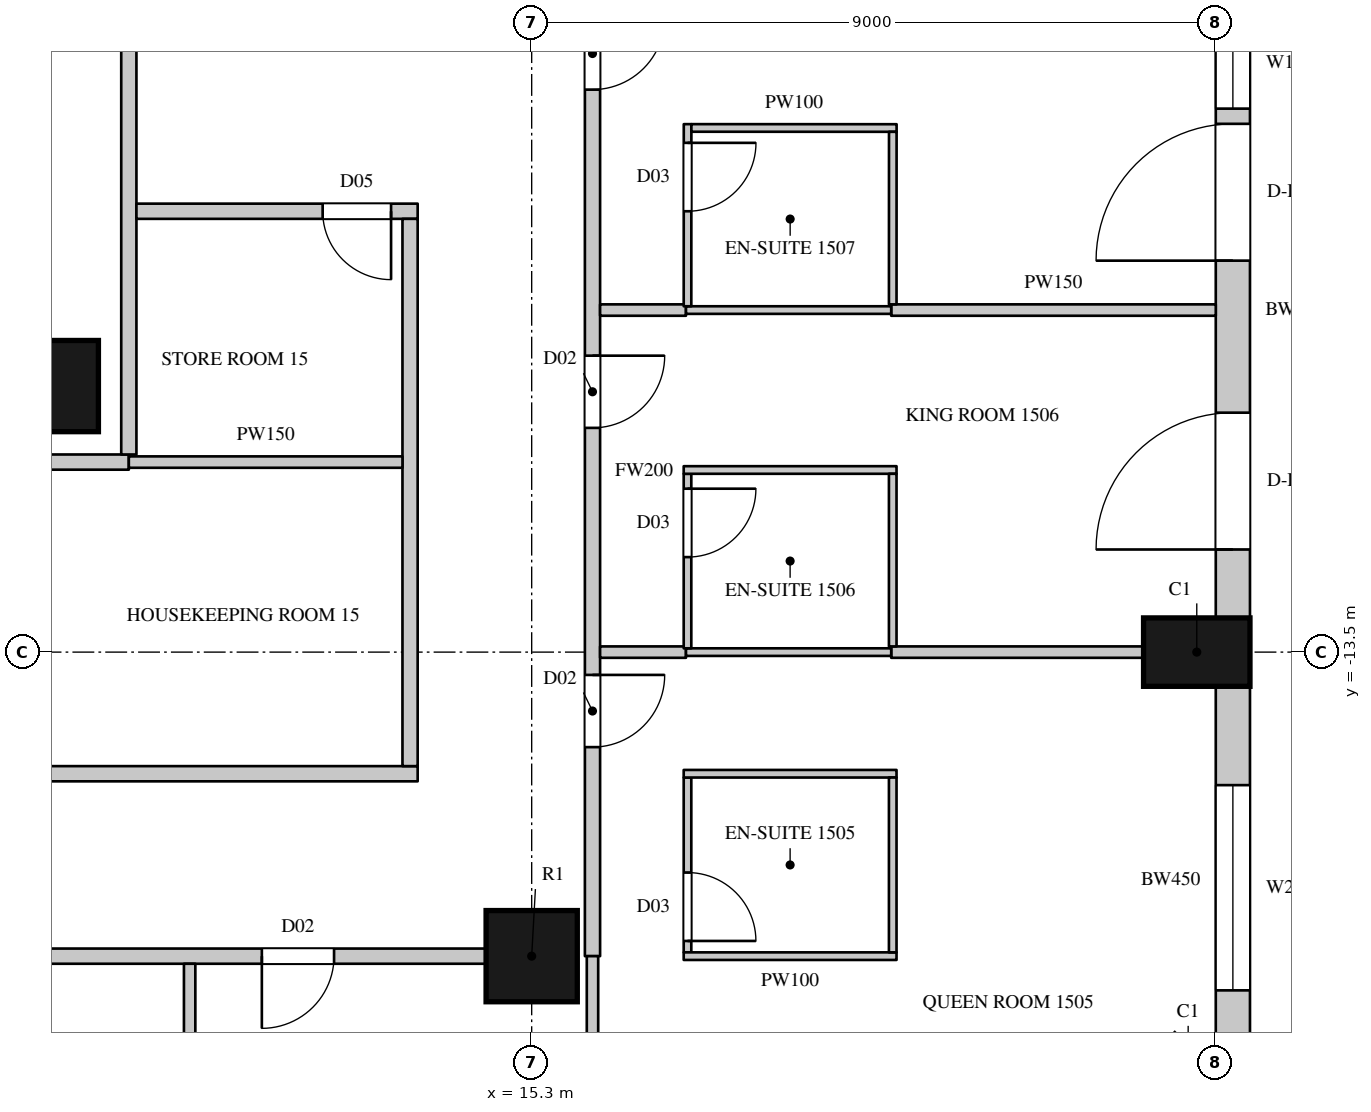
"""IFC4 building model, lengths in metres.
Left out: names, types, materials, properties, quantities, classifications, styles, units other than length and angle.
Written with IfcOpenShell. Run it as: python <this file> out.ifc"""

import sys

from ifc_helpers import new_model, si_unit, direction, frame, frame_2d, origin, origin_2d, place, context, subcontext, project, spatial, rectangle, circle, extrude, element, fill, save


model = new_model("IFC4")
c1 = context("Model", 3, precision=1e-05, world=origin(), true_north=direction((0.0, 1.0)))
c2 = subcontext(c1, "Body", "Model", "MODEL_VIEW")
j1 = project(units=[si_unit("LENGTHUNIT", "METRE"), si_unit("PLANEANGLEUNIT", "RADIAN")], contexts=[c1])
p1 = place(None, origin())
s1 = spatial("IfcSite", under=j1, at=p1, CompositionType="ELEMENT")
p2 = place(p1, origin())
s2 = spatial("IfcBuilding", under=s1, at=p2, CompositionType="ELEMENT")
p3 = place(p2, frame((0.0, 0.0, 84.3)))
s3 = spatial("IfcBuildingStorey", under=s2, at=p3, CompositionType="ELEMENT", Elevation=84.3)
p4 = place(p3, frame((24.05, -13.5, 0.0), z_axis=(0.0, 0.0, 1.0), x_axis=(0.0, 1.0, 0.0)))
e1 = element("IfcColumn", 1, at=p4, inside=s3, PredefinedType="COLUMN", context=c2, shape_type="SweptSolid", body=[
    extrude(rectangle(XDim=0.9, YDim=1.4, at=origin_2d()), origin(), (0.0, 0.0, 1.0), 3.6),
])
for number, where, z_axis, x_axis in (
    (2, (15.3, -17.5, 0.0), (0.0, 0.0, 1.0), (1.0, 0.0, 0.0)),
    (3, (9.0, -10.0, 0.0), (0.0, 0.0, 1.0), (1.0, 0.0, 0.0)),
):
    element("IfcColumn", number, at=place(p3, frame(where, z_axis=z_axis, x_axis=x_axis)), inside=s3, PredefinedType="COLUMN", context=c2, shape_type="SweptSolid", body=[
        extrude(circle(Radius=0.6, at=origin_2d()), origin(), (0.0, 0.0, 1.0), 3.6),
    ])
p5 = place(p3, frame((24.525, -19.064, 0.0), z_axis=(0.0, 0.0, 1.0), x_axis=(0.0, 1.0, 0.0)))
e4 = element("IfcWall", 4, at=p5, inside=s3, PredefinedType="SOLIDWALL", context=c2, shape_type="SweptSolid", body=[
    extrude(rectangle(XDim=5.114, YDim=0.45, at=frame_2d((2.557, 0.0))), origin(), (0.0, 0.0, 1.0), 3.3),
])
p6 = place(p5, frame((1.114, 0.0, 1.05)))
e5 = element("IfcOpeningElement", 5, at=p6, cuts=e4, PredefinedType="OPENING", context=c2, shape_type="SweptSolid", body=[
    extrude(rectangle(XDim=2.7, YDim=2.0, at=frame_2d((1.35, 1.0))), frame((0.0, 0.235, 0.0), z_axis=(0.0, -1.0, 0.0), x_axis=(1.0, 0.0, 0.0)), (0.0, 0.0, 1.0), 0.47),
])
p7 = place(p3, frame((24.525, -13.05, 0.0), z_axis=(0.0, 0.0, 1.0), x_axis=(0.0, 1.0, 0.0)))
e6 = element("IfcWall", 6, at=p7, inside=s3, PredefinedType="SOLIDWALL", context=c2, shape_type="SweptSolid", body=[
    extrude(rectangle(XDim=8.1, YDim=0.45, at=frame_2d((4.05, 0.0))), origin(), (0.0, 0.0, 1.0), 3.3),
])
p8 = place(p7, frame((0.9, 0.0, 0.0)))
e7 = element("IfcOpeningElement", 7, at=p8, cuts=e6, PredefinedType="OPENING", context=c2, shape_type="SweptSolid", body=[
    extrude(rectangle(XDim=1.8, YDim=2.4, at=frame_2d((0.9, 1.2))), frame((0.0, 0.235, 0.0), z_axis=(0.0, -1.0, 0.0), x_axis=(1.0, 0.0, 0.0)), (0.0, 0.0, 1.0), 0.47),
])
p9 = place(p7, frame((4.7, 0.0, 0.0)))
e8 = element("IfcOpeningElement", 8, at=p9, cuts=e6, PredefinedType="OPENING", context=c2, shape_type="SweptSolid", body=[
    extrude(rectangle(XDim=1.8, YDim=2.4, at=frame_2d((0.9, 1.2))), frame((0.0, 0.235, 0.0), z_axis=(0.0, -1.0, 0.0), x_axis=(1.0, 0.0, 0.0)), (0.0, 0.0, 1.0), 0.47),
])
p10 = place(p7, frame((6.7, 0.0, 1.05)))
e9 = element("IfcOpeningElement", 9, at=p10, cuts=e6, PredefinedType="OPENING", context=c2, shape_type="SweptSolid", body=[
    extrude(rectangle(XDim=1.2, YDim=2.0, at=frame_2d((0.6, 1.0))), frame((0.0, 0.235, 0.0), z_axis=(0.0, -1.0, 0.0), x_axis=(1.0, 0.0, 0.0)), (0.0, 0.0, 1.0), 0.47),
])
p11 = place(p3, frame((6.9, -17.5, 0.0), z_axis=(0.0, 0.0, 1.0), x_axis=(1.0, 0.0, 0.0)))
e10 = element("IfcWall", 10, at=p11, inside=s3, PredefinedType="PARTITIONING", context=c2, shape_type="SweptSolid", body=[
    extrude(rectangle(XDim=7.8, YDim=0.2, at=frame_2d((3.9, 0.0))), origin(), (0.0, 0.0, 1.0), 2.75),
])
p12 = place(p11, frame((4.85, 0.0, 0.0)))
e11 = element("IfcOpeningElement", 11, at=p12, cuts=e10, PredefinedType="OPENING", context=c2, shape_type="SweptSolid", body=[
    extrude(rectangle(XDim=0.95, YDim=2.2, at=frame_2d((0.475, 1.1))), frame((0.0, 0.11, 0.0), z_axis=(0.0, -1.0, 0.0), x_axis=(1.0, 0.0, 0.0)), (0.0, 0.0, 1.0), 0.22),
])
p13 = place(p3, frame((-8.1, -11.0, 0.0), z_axis=(0.0, 0.0, 1.0), x_axis=(1.0, 0.0, 0.0)))
e12 = element("IfcWall", 12, at=p13, inside=s3, PredefinedType="PARTITIONING", context=c2, shape_type="SweptSolid", body=[
    extrude(rectangle(XDim=18.1, YDim=0.2, at=frame_2d((9.05, 0.0))), origin(), (0.0, 0.0, 1.0), 3.3),
])
p14 = place(p13, frame((1.7, 0.0, 0.0)))
e13 = element("IfcOpeningElement", 13, at=p14, cuts=e12, PredefinedType="OPENING", context=c2, shape_type="SweptSolid", body=[
    extrude(rectangle(XDim=1.5, YDim=2.2, at=frame_2d((0.75, 1.1))), frame((0.0, 0.11, 0.0), z_axis=(0.0, -1.0, 0.0), x_axis=(1.0, 0.0, 0.0)), (0.0, 0.0, 1.0), 0.22),
])
p15 = place(p3, frame((-4.5, -15.1, 0.0), z_axis=(0.0, 0.0, 1.0), x_axis=(1.0, 0.0, 0.0)))
e14 = element("IfcWall", 14, at=p15, inside=s3, PredefinedType="PARTITIONING", context=c2, shape_type="SweptSolid", body=[
    extrude(rectangle(XDim=18.3, YDim=0.2, at=frame_2d((9.15, 0.0))), origin(), (0.0, 0.0, 1.0), 3.3),
])
p16 = place(p15, frame((10.05, 0.0, 0.0)))
e15 = element("IfcOpeningElement", 15, at=p16, cuts=e14, PredefinedType="OPENING", context=c2, shape_type="SweptSolid", body=[
    extrude(rectangle(XDim=0.9, YDim=2.2, at=frame_2d((0.45, 1.1))), frame((0.0, 0.11, 0.0), z_axis=(0.0, -1.0, 0.0), x_axis=(1.0, 0.0, 0.0)), (0.0, 0.0, 1.0), 0.22),
])
p17 = place(p3, frame((10.0, -10.9, 0.0), z_axis=(0.0, 0.0, 1.0), x_axis=(0.0, 1.0, 0.0)))
e16 = element("IfcWall", 16, at=p17, inside=s3, PredefinedType="PARTITIONING", context=c2, shape_type="SweptSolid", body=[
    extrude(rectangle(XDim=21.8, YDim=0.2, at=frame_2d((10.9, 0.0))), origin(), (0.0, 0.0, 1.0), 3.3),
])
p18 = place(p17, frame((15.9, 0.0, 0.0)))
e17 = element("IfcOpeningElement", 17, at=p18, cuts=e16, PredefinedType="OPENING", context=c2, shape_type="SweptSolid", body=[
    extrude(rectangle(XDim=1.5, YDim=2.2, at=frame_2d((0.75, 1.1))), frame((0.0, 0.11, 0.0), z_axis=(0.0, -1.0, 0.0), x_axis=(1.0, 0.0, 0.0)), (0.0, 0.0, 1.0), 0.22),
])
p19 = place(p17, frame((8.75, 0.0, 0.0)))
e18 = element("IfcOpeningElement", 18, at=p19, cuts=e16, PredefinedType="OPENING", context=c2, shape_type="SweptSolid", body=[
    extrude(rectangle(XDim=1.5, YDim=2.2, at=frame_2d((0.75, 1.1))), frame((0.0, 0.11, 0.0), z_axis=(0.0, -1.0, 0.0), x_axis=(1.0, 0.0, 0.0)), (0.0, 0.0, 1.0), 0.22),
])
p20 = place(p3, frame((10.1, -7.7, 0.0), z_axis=(0.0, 0.0, 1.0), x_axis=(1.0, 0.0, 0.0)))
e19 = element("IfcWall", 19, at=p20, inside=s3, PredefinedType="PARTITIONING", context=c2, shape_type="SweptSolid", body=[
    extrude(rectangle(XDim=3.7, YDim=0.2, at=frame_2d((1.85, 0.0))), origin(), (0.0, 0.0, 1.0), 3.3),
])
p21 = place(p20, frame((2.45, 0.0, 0.0)))
e20 = element("IfcOpeningElement", 20, at=p21, cuts=e19, PredefinedType="OPENING", context=c2, shape_type="SweptSolid", body=[
    extrude(rectangle(XDim=0.9, YDim=2.2, at=frame_2d((0.45, 1.1))), frame((0.0, 0.11, 0.0), z_axis=(0.0, -1.0, 0.0), x_axis=(1.0, 0.0, 0.0)), (0.0, 0.0, 1.0), 0.22),
])
p22 = place(p3, frame((13.7, -15.0, 0.0), z_axis=(0.0, 0.0, 1.0), x_axis=(0.0, 1.0, 0.0)))
e21 = element("IfcWall", 21, at=p22, inside=s3, PredefinedType="PARTITIONING", context=c2, shape_type="SweptSolid", body=[
    extrude(rectangle(XDim=7.2, YDim=0.2, at=frame_2d((3.6, 0.0))), origin(), (0.0, 0.0, 1.0), 3.3),
])
p23 = place(p3, frame((16.1, -17.5, 0.0), z_axis=(0.0, 0.0, 1.0), x_axis=(0.0, 1.0, 0.0)))
e22 = element("IfcWall", 22, at=p23, inside=s3, PredefinedType="PARTITIONING", context=c2, shape_type="SweptSolid", body=[
    extrude(rectangle(XDim=12.75, YDim=0.2, at=frame_2d((6.375, 0.0))), origin(), (0.0, 0.0, 1.0), 3.3),
])
p24 = place(p23, frame((2.75, 0.0, 0.0)))
e23 = element("IfcOpeningElement", 23, at=p24, cuts=e22, PredefinedType="OPENING", context=c2, shape_type="SweptSolid", body=[
    extrude(rectangle(XDim=0.95, YDim=2.2, at=frame_2d((0.475, 1.1))), frame((0.0, 0.11, 0.0), z_axis=(0.0, -1.0, 0.0), x_axis=(1.0, 0.0, 0.0)), (0.0, 0.0, 1.0), 0.22),
])
p25 = place(p23, frame((6.95, 0.0, 0.0)))
e24 = element("IfcOpeningElement", 24, at=p25, cuts=e22, PredefinedType="OPENING", context=c2, shape_type="SweptSolid", body=[
    extrude(rectangle(XDim=0.95, YDim=2.2, at=frame_2d((0.475, 1.1))), frame((0.0, 0.11, 0.0), z_axis=(0.0, -1.0, 0.0), x_axis=(1.0, 0.0, 0.0)), (0.0, 0.0, 1.0), 0.22),
])
p26 = place(p23, frame((11.4, 0.0, 0.0)))
e25 = element("IfcOpeningElement", 25, at=p26, cuts=e22, PredefinedType="OPENING", context=c2, shape_type="SweptSolid", body=[
    extrude(rectangle(XDim=0.95, YDim=2.2, at=frame_2d((0.475, 1.1))), frame((0.0, 0.11, 0.0), z_axis=(0.0, -1.0, 0.0), x_axis=(1.0, 0.0, 0.0)), (0.0, 0.0, 1.0), 0.22),
])
p27 = place(p3, frame((10.0, -11.0, 0.0), z_axis=(0.0, 0.0, 1.0), x_axis=(1.0, 0.0, 0.0)))
e26 = element("IfcWall", 26, at=p27, inside=s3, PredefinedType="PARTITIONING", context=c2, shape_type="SweptSolid", body=[
    extrude(rectangle(XDim=3.6, YDim=0.15, at=frame_2d((1.8, 0.0))), origin(), (0.0, 0.0, 1.0), 3.3),
])
p28 = place(p3, frame((10.8, -25.7, 0.0), z_axis=(0.0, 0.0, 1.0), x_axis=(0.0, 1.0, 0.0)))
e27 = element("IfcWall", 27, at=p28, inside=s3, PredefinedType="PARTITIONING", context=c2, shape_type="SweptSolid", body=[
    extrude(rectangle(XDim=8.1, YDim=0.15, at=frame_2d((4.05, 0.0))), origin(), (0.0, 0.0, 1.0), 2.65),
])
p29 = place(p3, frame((16.1, -18.73, 0.0), z_axis=(0.0, 0.0, 1.0), x_axis=(0.0, 1.0, 0.0)))
e28 = element("IfcWall", 28, at=p29, inside=s3, PredefinedType="PARTITIONING", context=c2, shape_type="SweptSolid", body=[
    extrude(rectangle(XDim=1.23, YDim=0.15, at=frame_2d((0.615, 0.0))), origin(), (0.0, 0.0, 1.0), 3.3),
])
p30 = place(p3, frame((16.2, -13.5, 0.0), z_axis=(0.0, 0.0, 1.0), x_axis=(1.0, 0.0, 0.0)))
e29 = element("IfcWall", 29, at=p30, inside=s3, PredefinedType="PARTITIONING", context=c2, shape_type="SweptSolid", body=[
    extrude(rectangle(XDim=1.13, YDim=0.15, at=frame_2d((0.565, 0.0))), origin(), (0.0, 0.0, 1.0), 3.3),
])
p31 = place(p3, frame((16.2, -9.0, 0.0), z_axis=(0.0, 0.0, 1.0), x_axis=(1.0, 0.0, 0.0)))
e30 = element("IfcWall", 30, at=p31, inside=s3, PredefinedType="PARTITIONING", context=c2, shape_type="SweptSolid", body=[
    extrude(rectangle(XDim=1.13, YDim=0.15, at=frame_2d((0.565, 0.0))), origin(), (0.0, 0.0, 1.0), 2.65),
])
p32 = place(p3, frame((20.03, -13.5, 0.0), z_axis=(0.0, 0.0, 1.0), x_axis=(1.0, 0.0, 0.0)))
e31 = element("IfcWall", 31, at=p32, inside=s3, PredefinedType="PARTITIONING", context=c2, shape_type="SweptSolid", body=[
    extrude(rectangle(XDim=3.32, YDim=0.15, at=frame_2d((1.66, 0.0))), origin(), (0.0, 0.0, 1.0), 3.3),
])
p33 = place(p3, frame((20.03, -9.0, 0.0), z_axis=(0.0, 0.0, 1.0), x_axis=(1.0, 0.0, 0.0)))
e32 = element("IfcWall", 32, at=p33, inside=s3, PredefinedType="PARTITIONING", context=c2, shape_type="SweptSolid", body=[
    extrude(rectangle(XDim=4.27, YDim=0.15, at=frame_2d((2.135, 0.0))), origin(), (0.0, 0.0, 1.0), 2.65),
])
p34 = place(p3, frame((17.33, -13.5, 0.0), z_axis=(0.0, 0.0, 1.0), x_axis=(1.0, 0.0, 0.0)))
e33 = element("IfcWall", 33, at=p34, inside=s3, PredefinedType="PARTITIONING", context=c2, shape_type="SweptSolid", body=[
    extrude(rectangle(XDim=2.7, YDim=0.1, at=frame_2d((1.35, 0.0))), origin(), (0.0, 0.0, 1.0), 3.3),
])
p35 = place(p3, frame((17.33, -9.0, 0.0), z_axis=(0.0, 0.0, 1.0), x_axis=(1.0, 0.0, 0.0)))
e34 = element("IfcWall", 34, at=p35, inside=s3, PredefinedType="PARTITIONING", context=c2, shape_type="SweptSolid", body=[
    extrude(rectangle(XDim=2.7, YDim=0.1, at=frame_2d((1.35, 0.0))), origin(), (0.0, 0.0, 1.0), 2.65),
])
p36 = place(p3, frame((17.35, -17.45, 0.0), z_axis=(0.0, 0.0, 1.0), x_axis=(0.0, 1.0, 0.0)))
e35 = element("IfcWall", 35, at=p36, inside=s3, PredefinedType="PARTITIONING", context=c2, shape_type="SweptSolid", body=[
    extrude(rectangle(XDim=2.3, YDim=0.1, at=frame_2d((1.15, 0.0))), origin(), (0.0, 0.0, 1.0), 3.3),
])
p37 = place(p36, frame((0.15, 0.0, 0.0)))
e36 = element("IfcOpeningElement", 36, at=p37, cuts=e35, PredefinedType="OPENING", context=c2, shape_type="SweptSolid", body=[
    extrude(rectangle(XDim=0.9, YDim=2.2, at=frame_2d((0.45, 1.1))), frame((0.0, 0.06, 0.0), z_axis=(0.0, -1.0, 0.0), x_axis=(1.0, 0.0, 0.0)), (0.0, 0.0, 1.0), 0.12),
])
for number, where, z_axis, x_axis in (
    (37, (17.3, -17.5, 0.0), (0.0, 0.0, 1.0), (1.0, 0.0, 0.0)),
    (38, (17.3, -15.1, 0.0), (0.0, 0.0, 1.0), (1.0, 0.0, 0.0)),
):
    element("IfcWall", number, at=place(p3, frame(where, z_axis=z_axis, x_axis=x_axis)), inside=s3, PredefinedType="PARTITIONING", context=c2, shape_type="SweptSolid", body=[
        extrude(rectangle(XDim=2.8, YDim=0.1, at=frame_2d((1.4, 0.0))), origin(), (0.0, 0.0, 1.0), 3.3),
    ])
p38 = place(p3, frame((17.35, -13.45, 0.0), z_axis=(0.0, 0.0, 1.0), x_axis=(0.0, 1.0, 0.0)))
e39 = element("IfcWall", 39, at=p38, inside=s3, PredefinedType="PARTITIONING", context=c2, shape_type="SweptSolid", body=[
    extrude(rectangle(XDim=2.296, YDim=0.1, at=frame_2d((1.148, 0.0))), origin(), (0.0, 0.0, 1.0), 3.3),
])
p39 = place(p38, frame((1.2, 0.0, 0.0)))
e40 = element("IfcOpeningElement", 40, at=p39, cuts=e39, PredefinedType="OPENING", context=c2, shape_type="SweptSolid", body=[
    extrude(rectangle(XDim=0.9, YDim=2.2, at=frame_2d((0.45, 1.1))), frame((0.0, 0.06, 0.0), z_axis=(0.0, -1.0, 0.0), x_axis=(1.0, 0.0, 0.0)), (0.0, 0.0, 1.0), 0.12),
])
p40 = place(p3, frame((17.3, -11.104, 0.0), z_axis=(0.0, 0.0, 1.0), x_axis=(1.0, 0.0, 0.0)))
e41 = element("IfcWall", 41, at=p40, inside=s3, PredefinedType="PARTITIONING", context=c2, shape_type="SweptSolid", body=[
    extrude(rectangle(XDim=2.8, YDim=0.1, at=frame_2d((1.4, 0.0))), origin(), (0.0, 0.0, 1.0), 3.3),
])
p41 = place(p3, frame((17.35, -8.95, 0.0), z_axis=(0.0, 0.0, 1.0), x_axis=(0.000407580973, 0.999999916939, 0.0)))
e42 = element("IfcWall", 42, at=p41, inside=s3, PredefinedType="PARTITIONING", context=c2, shape_type="SweptSolid", body=[
    extrude(rectangle(XDim=2.396, YDim=0.1, at=frame_2d((1.198, 0.0))), origin(), (0.0, 0.0, 1.0), 3.3),
])
p42 = place(p41, frame((1.25, 0.0, 0.0)))
e43 = element("IfcOpeningElement", 43, at=p42, cuts=e42, PredefinedType="OPENING", context=c2, shape_type="SweptSolid", body=[
    extrude(rectangle(XDim=0.9, YDim=2.2, at=frame_2d((0.45, 1.1))), frame((0.0, 0.06, 0.0), z_axis=(0.0, -1.0, 0.0), x_axis=(1.0, 0.0, 0.0)), (0.0, 0.0, 1.0), 0.12),
])
p43 = place(p3, frame((17.401, -6.604, 0.0), z_axis=(0.0, 0.0, 1.0), x_axis=(0.9999999346, -0.000361663629, 0.0)))
e44 = element("IfcWall", 44, at=p43, inside=s3, PredefinedType="PARTITIONING", context=c2, shape_type="SweptSolid", body=[
    extrude(rectangle(XDim=2.7, YDim=0.1, at=frame_2d((1.35, 0.0))), origin(), (0.0, 0.0, 1.0), 3.3),
])
p44 = place(p3, frame((20.05, -17.45, 0.0), z_axis=(0.0, 0.0, 1.0), x_axis=(0.0, 1.0, 0.0)))
e45 = element("IfcWall", 45, at=p44, inside=s3, PredefinedType="PARTITIONING", context=c2, shape_type="SweptSolid", body=[
    extrude(rectangle(XDim=2.3, YDim=0.1, at=frame_2d((1.15, 0.0))), origin(), (0.0, 0.0, 1.0), 3.3),
])
p45 = place(p3, frame((20.05, -13.425, 0.0), z_axis=(0.0, 0.0, 1.0), x_axis=(0.0, 1.0, 0.0)))
e46 = element("IfcWall", 46, at=p45, inside=s3, PredefinedType="PARTITIONING", context=c2, shape_type="SweptSolid", body=[
    extrude(rectangle(XDim=2.271, YDim=0.1, at=frame_2d((1.135, 0.0))), origin(), (0.0, 0.0, 1.0), 3.3),
])
p46 = place(p3, frame((20.05, -8.925, 0.0), z_axis=(0.0, 0.0, 1.0), x_axis=(0.000430200003, 0.999999907464, 0.0)))
e47 = element("IfcWall", 47, at=p46, inside=s3, PredefinedType="PARTITIONING", context=c2, shape_type="SweptSolid", body=[
    extrude(rectangle(XDim=2.27, YDim=0.1, at=frame_2d((1.135, 0.0))), origin(), (0.0, 0.0, 1.0), 3.3),
])
p47 = place(p6, origin())
e48 = element("IfcWindow", 48, at=p47, inside=s3, PartitioningType="SINGLE_PANEL", PredefinedType="WINDOW", context=c2, shape_type="SweptSolid", body=[
    extrude(rectangle(XDim=2.7, YDim=2.0, at=frame_2d((1.35, 1.0))), frame((0.0, 0.135, 0.0), z_axis=(0.0, -1.0, 0.0), x_axis=(1.0, 0.0, 0.0)), (0.0, 0.0, 1.0), 0.06),
])
fill(e5, e48)
p48 = place(p8, origin())
e49 = element("IfcDoor", 49, at=p48, inside=s3, OperationType="SLIDING_TO_LEFT", PredefinedType="DOOR", context=c2, shape_type="SweptSolid", body=[
    extrude(rectangle(XDim=1.8, YDim=2.4, at=frame_2d((0.9, 1.2))), frame((0.0, 0.13, 0.0), z_axis=(0.0, -1.0, 0.0), x_axis=(1.0, 0.0, 0.0)), (0.0, 0.0, 1.0), 0.05),
])
fill(e7, e49)
p49 = place(p9, origin())
e50 = element("IfcDoor", 50, at=p49, inside=s3, OperationType="SLIDING_TO_LEFT", PredefinedType="DOOR", context=c2, shape_type="SweptSolid", body=[
    extrude(rectangle(XDim=1.8, YDim=2.4, at=frame_2d((0.9, 1.2))), frame((0.0, 0.13, 0.0), z_axis=(0.0, -1.0, 0.0), x_axis=(1.0, 0.0, 0.0)), (0.0, 0.0, 1.0), 0.05),
])
fill(e8, e50)
p50 = place(p10, origin())
e51 = element("IfcWindow", 51, at=p50, inside=s3, PartitioningType="SINGLE_PANEL", PredefinedType="WINDOW", context=c2, shape_type="SweptSolid", body=[
    extrude(rectangle(XDim=1.2, YDim=2.0, at=frame_2d((0.6, 1.0))), frame((0.0, 0.135, 0.0), z_axis=(0.0, -1.0, 0.0), x_axis=(1.0, 0.0, 0.0)), (0.0, 0.0, 1.0), 0.06),
])
fill(e9, e51)
p51 = place(p21, origin())
e52 = element("IfcDoor", 52, at=p51, inside=s3, OperationType="SINGLE_SWING_LEFT", PredefinedType="DOOR", context=c2, shape_type="SweptSolid", body=[
    extrude(rectangle(XDim=0.9, YDim=2.2, at=frame_2d((0.45, 1.1))), frame((0.0, 0.025, 0.0), z_axis=(0.0, -1.0, 0.0), x_axis=(1.0, 0.0, 0.0)), (0.0, 0.0, 1.0), 0.05),
])
fill(e20, e52)
p52 = place(p24, origin())
e53 = element("IfcDoor", 53, at=p52, inside=s3, OperationType="SINGLE_SWING_LEFT", PredefinedType="DOOR", context=c2, shape_type="SweptSolid", body=[
    extrude(rectangle(XDim=0.95, YDim=2.2, at=frame_2d((0.475, 1.1))), frame((0.0, 0.025, 0.0), z_axis=(0.0, -1.0, 0.0), x_axis=(1.0, 0.0, 0.0)), (0.0, 0.0, 1.0), 0.05),
])
fill(e23, e53)
p53 = place(p37, origin())
e54 = element("IfcDoor", 54, at=p53, inside=s3, OperationType="SINGLE_SWING_RIGHT", PredefinedType="DOOR", context=c2, shape_type="SweptSolid", body=[
    extrude(rectangle(XDim=0.9, YDim=2.2, at=frame_2d((0.45, 1.1))), frame((0.0, 0.025, 0.0), z_axis=(0.0, -1.0, 0.0), x_axis=(1.0, 0.0, 0.0)), (0.0, 0.0, 1.0), 0.05),
])
fill(e36, e54)
p54 = place(p25, origin())
e55 = element("IfcDoor", 55, at=p54, inside=s3, OperationType="SINGLE_SWING_LEFT", PredefinedType="DOOR", context=c2, shape_type="SweptSolid", body=[
    extrude(rectangle(XDim=0.95, YDim=2.2, at=frame_2d((0.475, 1.1))), frame((0.0, 0.025, 0.0), z_axis=(0.0, -1.0, 0.0), x_axis=(1.0, 0.0, 0.0)), (0.0, 0.0, 1.0), 0.05),
])
fill(e24, e55)
p55 = place(p39, origin())
e56 = element("IfcDoor", 56, at=p55, inside=s3, OperationType="SINGLE_SWING_LEFT", PredefinedType="DOOR", context=c2, shape_type="SweptSolid", body=[
    extrude(rectangle(XDim=0.9, YDim=2.2, at=frame_2d((0.45, 1.1))), frame((0.0, 0.025, 0.0), z_axis=(0.0, -1.0, 0.0), x_axis=(1.0, 0.0, 0.0)), (0.0, 0.0, 1.0), 0.05),
])
fill(e40, e56)
p56 = place(p26, origin())
e57 = element("IfcDoor", 57, at=p56, inside=s3, OperationType="SINGLE_SWING_LEFT", PredefinedType="DOOR", context=c2, shape_type="SweptSolid", body=[
    extrude(rectangle(XDim=0.95, YDim=2.2, at=frame_2d((0.475, 1.1))), frame((0.0, 0.025, 0.0), z_axis=(0.0, -1.0, 0.0), x_axis=(1.0, 0.0, 0.0)), (0.0, 0.0, 1.0), 0.05),
])
fill(e25, e57)
p57 = place(p42, origin())
e58 = element("IfcDoor", 58, at=p57, inside=s3, OperationType="SINGLE_SWING_LEFT", PredefinedType="DOOR", context=c2, shape_type="SweptSolid", body=[
    extrude(rectangle(XDim=0.9, YDim=2.2, at=frame_2d((0.45, 1.1))), frame((0.0, 0.025, 0.0), z_axis=(0.0, -1.0, 0.0), x_axis=(1.0, 0.0, 0.0)), (0.0, 0.0, 1.0), 0.05),
])
fill(e43, e58)
p58 = place(p12, origin())
e59 = element("IfcDoor", 59, at=p58, inside=s3, OperationType="SINGLE_SWING_RIGHT", PredefinedType="DOOR", context=c2, shape_type="SweptSolid", body=[
    extrude(rectangle(XDim=0.95, YDim=2.2, at=frame_2d((0.475, 1.1))), frame((0.0, 0.025, 0.0), z_axis=(0.0, -1.0, 0.0), x_axis=(1.0, 0.0, 0.0)), (0.0, 0.0, 1.0), 0.05),
])
fill(e11, e59)
save(model, sys.argv[1])
